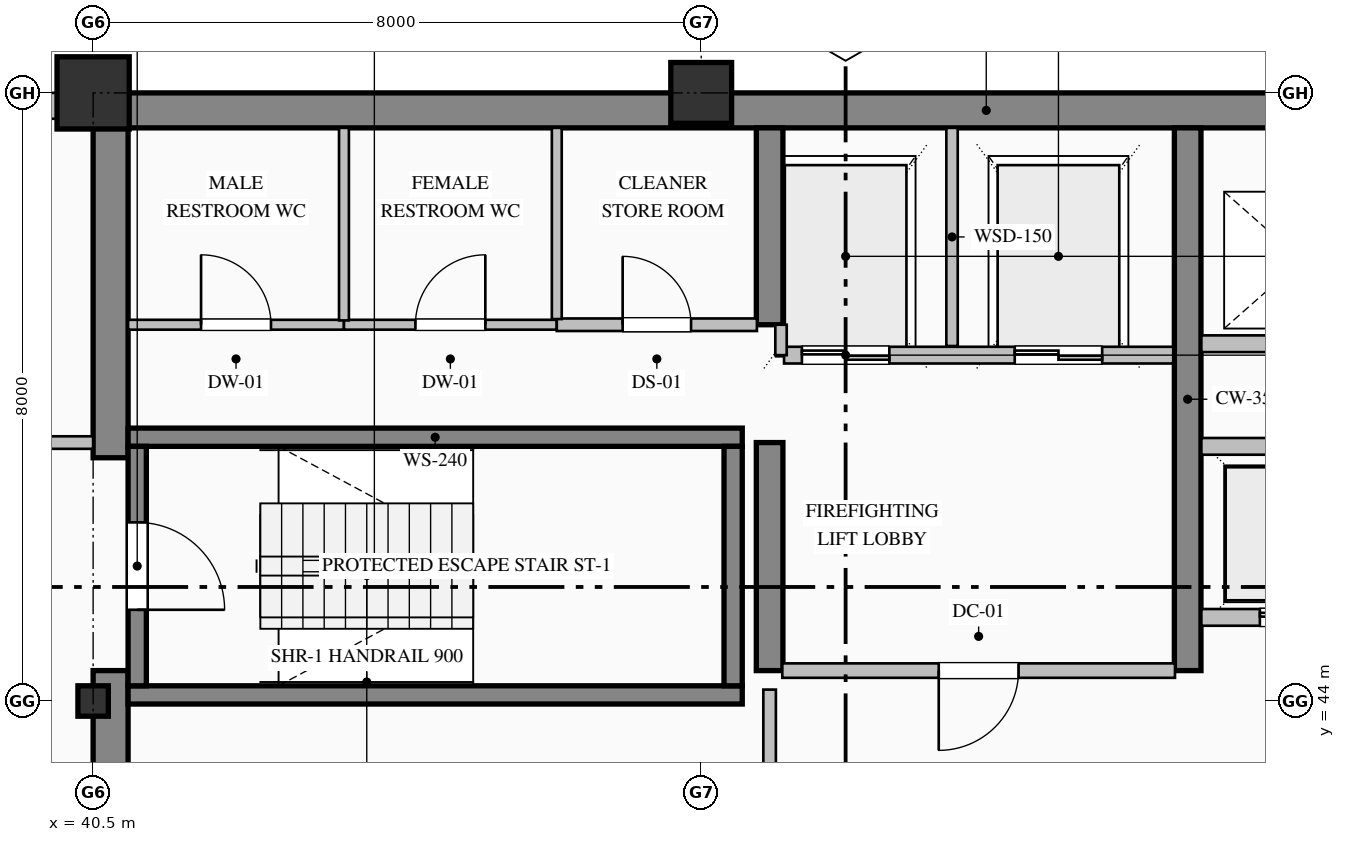
"""IFC4 building model, lengths in metres.
Left out: names, types, materials, properties, quantities, classifications, styles, units other than length and angle.
Written with IfcOpenShell. Run it as: python <this file> out.ifc"""

import sys

from ifc_helpers import new_model, si_unit, direction, frame, frame_2d, origin, origin_2d, place, context, subcontext, project, spatial, rectangle, hollow_rectangle, i_section, extrude, element, fill, save


model = new_model("IFC4")
c1 = context("Model", 3, precision=1e-05, world=origin(), true_north=direction((0.0, 1.0)))
c2 = subcontext(c1, "Body", "Model", "MODEL_VIEW")
j1 = project(units=[si_unit("LENGTHUNIT", "METRE"), si_unit("PLANEANGLEUNIT", "RADIAN")], contexts=[c1])
p1 = place(None, origin())
s1 = spatial("IfcSite", under=j1, at=p1, CompositionType="ELEMENT")
p2 = place(p1, origin())
s2 = spatial("IfcBuilding", under=s1, at=p2, CompositionType="ELEMENT")
p3 = place(p2, frame((0.0, 0.0, 221.8)))
s3 = spatial("IfcBuildingStorey", under=s2, at=p3, CompositionType="ELEMENT", Elevation=221.8)
p4 = place(p3, frame((40.5, 51.77, 0.0), z_axis=(0.0, 0.0, 1.0), x_axis=(1.0, 0.0, 0.0)))
e1 = element("IfcWall", 1, at=p4, inside=s3, PredefinedType="SHEAR", context=c2, shape_type="SweptSolid", body=[
    extrude(rectangle(XDim=23.5, YDim=0.46, at=frame_2d((11.75, 0.0))), origin(), (0.0, 0.0, 1.0), 3.775),
])
p5 = place(p3, frame((40.73, 36.46, 0.0), z_axis=(0.0, 0.0, 1.0), x_axis=(0.0, 1.0, 0.0)))
e2 = element("IfcWall", 2, at=p5, inside=s3, PredefinedType="SHEAR", context=c2, shape_type="SweptSolid", body=[
    extrude(rectangle(XDim=7.94, YDim=0.46, at=frame_2d((3.97, 0.0))), origin(), (0.0, 0.0, 1.0), 3.775),
])
p6 = place(p3, frame((40.73, 47.2, 0.0), z_axis=(0.0, 0.0, 1.0), x_axis=(0.0, 1.0, 0.0)))
e3 = element("IfcWall", 3, at=p6, inside=s3, PredefinedType="SHEAR", context=c2, shape_type="SweptSolid", body=[
    extrude(rectangle(XDim=4.34, YDim=0.46, at=frame_2d((2.17, 0.0))), origin(), (0.0, 0.0, 1.0), 3.775),
])
p7 = place(p3, frame((49.4, 44.4, 0.0), z_axis=(0.0, 0.0, 1.0), x_axis=(0.0, 1.0, 0.0)))
e4 = element("IfcWall", 4, at=p7, inside=s3, PredefinedType="SHEAR", context=c2, shape_type="SweptSolid", body=[
    extrude(rectangle(XDim=3.0, YDim=0.35, at=frame_2d((1.5, 0.0))), origin(), (0.0, 0.0, 1.0), 3.775),
])
p8 = place(p3, frame((49.4, 48.95, 0.0), z_axis=(0.0, 0.0, 1.0), x_axis=(0.0, 1.0, 0.0)))
e5 = element("IfcWall", 5, at=p8, inside=s3, PredefinedType="SHEAR", context=c2, shape_type="SweptSolid", body=[
    extrude(rectangle(XDim=2.59, YDim=0.35, at=frame_2d((1.295, 0.0))), origin(), (0.0, 0.0, 1.0), 3.775),
])
p9 = place(p3, frame((54.9, 44.4, 0.0), z_axis=(0.0, 0.0, 1.0), x_axis=(0.0, 1.0, 0.0)))
e6 = element("IfcWall", 6, at=p9, inside=s3, PredefinedType="SHEAR", context=c2, shape_type="SweptSolid", body=[
    extrude(rectangle(XDim=7.14, YDim=0.35, at=frame_2d((3.57, 0.0))), origin(), (0.0, 0.0, 1.0), 3.775),
])
p10 = place(p3, frame((40.5, 44.0, 0.0), z_axis=(0.0, 0.0, 1.0), x_axis=(1.0, 0.0, 0.0)))
e7 = element("IfcColumn", 7, at=p10, inside=s3, PredefinedType="COLUMN", context=c2, shape_type="SweptSolid", body=[
    extrude(i_section(OverallWidth=0.4, OverallDepth=0.4, WebThickness=0.013, FlangeThickness=0.021, FilletRadius=0.022, at=origin_2d()), origin(), (0.0, 0.0, 1.0), 4.0),
])
p11 = place(p3, frame((40.5, 52.0, 0.0), z_axis=(0.0, 0.0, 1.0), x_axis=(1.0, 0.0, 0.0)))
e8 = element("IfcColumn", 8, at=p11, inside=s3, PredefinedType="COLUMN", context=c2, shape_type="SweptSolid", body=[
    extrude(hollow_rectangle(XDim=0.95, YDim=0.95, WallThickness=0.036, at=origin_2d()), origin(), (0.0, 0.0, 1.0), 4.0),
])
p12 = place(p3, frame((48.5, 52.0, 0.0), z_axis=(0.0, 0.0, 1.0), x_axis=(1.0, 0.0, 0.0)))
e9 = element("IfcColumn", 9, at=p12, inside=s3, PredefinedType="COLUMN", context=c2, shape_type="SweptSolid", body=[
    extrude(hollow_rectangle(XDim=0.8, YDim=0.8, WallThickness=0.032, at=origin_2d()), origin(), (0.0, 0.0, 1.0), 4.0),
])
p13 = place(p3, frame((13.0, 51.83, 0.0), z_axis=(0.0, 0.0, 1.0), x_axis=(1.0, 0.0, 0.0)))
e10 = element("IfcWall", 10, at=p13, inside=s3, PredefinedType="SOLIDWALL", context=c2, shape_type="SweptSolid", body=[
    extrude(rectangle(XDim=27.52, YDim=0.34, at=frame_2d((13.76, 0.0))), origin(), (0.0, 0.0, 1.0), 3.325),
])
p14 = place(p13, frame((6.45, 0.0, 0.7)))
e11 = element("IfcOpeningElement", 11, at=p14, cuts=e10, PredefinedType="OPENING", context=c2, shape_type="SweptSolid", body=[
    extrude(rectangle(XDim=1.5, YDim=2.4, at=frame_2d((0.75, 1.2))), frame((0.0, 0.18, 0.0), z_axis=(0.0, -1.0, 0.0), x_axis=(1.0, 0.0, 0.0)), (0.0, 0.0, 1.0), 0.36),
])
for number, where, z_axis, x_axis in (
    (12, (40.96, 47.47, 0.0), (0.0, 0.0, 1.0), (1.0, 0.0, 0.0)),
    (13, (49.04, 44.08, 0.0), (0.0, 0.0, 1.0), (-1.0, 0.0, 0.0)),
):
    element("IfcWall", number, at=place(p3, frame(where, z_axis=z_axis, x_axis=x_axis)), inside=s3, PredefinedType="SOLIDWALL", context=c2, shape_type="SweptSolid", body=[
        extrude(rectangle(XDim=8.08, YDim=0.24, at=frame_2d((4.04, 0.0))), origin(), (0.0, 0.0, 1.0), 4.0),
    ])
p15 = place(p3, frame((41.08, 47.35, 0.0), z_axis=(0.0, 0.0, 1.0), x_axis=(0.0, -1.0, 0.0)))
e14 = element("IfcWall", 14, at=p15, inside=s3, PredefinedType="SOLIDWALL", context=c2, shape_type="SweptSolid", body=[
    extrude(rectangle(XDim=3.15, YDim=0.24, at=frame_2d((1.575, 0.0))), origin(), (0.0, 0.0, 1.0), 4.0),
])
p16 = place(p15, frame((1.0, 0.0, 0.0)))
e15 = element("IfcOpeningElement", 15, at=p16, cuts=e14, PredefinedType="OPENING", context=c2, shape_type="SweptSolid", body=[
    extrude(rectangle(XDim=1.15, YDim=2.2, at=frame_2d((0.575, 1.1))), frame((0.0, 0.13, 0.0), z_axis=(0.0, -1.0, 0.0), x_axis=(1.0, 0.0, 0.0)), (0.0, 0.0, 1.0), 0.26),
])
p17 = place(p3, frame((48.92, 44.2, 0.0), z_axis=(0.0, 0.0, 1.0), x_axis=(0.0, 1.0, 0.0)))
e16 = element("IfcWall", 16, at=p17, inside=s3, PredefinedType="SOLIDWALL", context=c2, shape_type="SweptSolid", body=[
    extrude(rectangle(XDim=3.15, YDim=0.24, at=frame_2d((1.575, 0.0))), origin(), (0.0, 0.0, 1.0), 4.0),
])
p18 = place(p3, frame((54.71, 48.55, 0.0), z_axis=(0.0, 0.0, 1.0), x_axis=(-1.0, 0.0, 0.0)))
e17 = element("IfcWall", 17, at=p18, inside=s3, PredefinedType="PARTITIONING", context=c2, shape_type="SweptSolid", body=[
    extrude(rectangle(XDim=5.12, YDim=0.22, at=frame_2d((2.56, 0.0))), origin(), (0.0, 0.0, 1.0), 3.775),
])
p19 = place(p18, frame((3.735, 0.0, 0.0)))
e18 = element("IfcOpeningElement", 18, at=p19, cuts=e17, PredefinedType="OPENING", context=c2, shape_type="SweptSolid", body=[
    extrude(rectangle(XDim=1.15, YDim=2.2, at=frame_2d((0.575, 1.1))), frame((0.0, 0.12, 0.0), z_axis=(0.0, -1.0, 0.0), x_axis=(1.0, 0.0, 0.0)), (0.0, 0.0, 1.0), 0.24),
])
p20 = place(p18, frame((0.935, 0.0, 0.0)))
e19 = element("IfcOpeningElement", 19, at=p20, cuts=e17, PredefinedType="OPENING", context=c2, shape_type="SweptSolid", body=[
    extrude(rectangle(XDim=1.15, YDim=2.2, at=frame_2d((0.575, 1.1))), frame((0.0, 0.12, 0.0), z_axis=(0.0, -1.0, 0.0), x_axis=(1.0, 0.0, 0.0)), (0.0, 0.0, 1.0), 0.24),
])
p21 = place(p3, frame((51.8, 48.67, 0.0), z_axis=(0.0, 0.0, 1.0), x_axis=(0.0, 1.0, 0.0)))
e20 = element("IfcWall", 20, at=p21, inside=s3, PredefinedType="PARTITIONING", context=c2, shape_type="SweptSolid", body=[
    extrude(rectangle(XDim=2.87, YDim=0.15, at=frame_2d((1.435, 0.0))), origin(), (0.0, 0.0, 1.0), 3.775),
])
p22 = place(p3, frame((49.55, 48.55, 0.0), z_axis=(0.0, 0.0, 1.0), x_axis=(0.0, 1.0, 0.0)))
e21 = element("IfcWall", 21, at=p22, inside=s3, PredefinedType="PARTITIONING", context=c2, shape_type="SweptSolid", body=[
    extrude(rectangle(XDim=0.4, YDim=0.15, at=frame_2d((0.2, 0.0))), origin(), (0.0, 0.0, 1.0), 3.775),
])
p23 = place(p3, frame((63.32, 45.1, 0.0), z_axis=(0.0, 0.0, 1.0), x_axis=(-1.0, 0.0, 0.0)))
e22 = element("IfcWall", 22, at=p23, inside=s3, PredefinedType="PARTITIONING", context=c2, shape_type="SweptSolid", body=[
    extrude(rectangle(XDim=8.24, YDim=0.22, at=frame_2d((4.12, 0.0))), origin(), (0.0, 0.0, 1.0), 3.775),
])
p24 = place(p23, frame((6.37, 0.0, 0.0)))
e23 = element("IfcOpeningElement", 23, at=p24, cuts=e22, PredefinedType="OPENING", context=c2, shape_type="SweptSolid", body=[
    extrude(rectangle(XDim=1.1, YDim=2.2, at=frame_2d((0.55, 1.1))), frame((0.0, 0.12, 0.0), z_axis=(0.0, -1.0, 0.0), x_axis=(1.0, 0.0, 0.0)), (0.0, 0.0, 1.0), 0.24),
])
p25 = place(p23, frame((3.57, 0.0, 0.0)))
e24 = element("IfcOpeningElement", 24, at=p25, cuts=e22, PredefinedType="OPENING", context=c2, shape_type="SweptSolid", body=[
    extrude(rectangle(XDim=1.1, YDim=2.2, at=frame_2d((0.55, 1.1))), frame((0.0, 0.12, 0.0), z_axis=(0.0, -1.0, 0.0), x_axis=(1.0, 0.0, 0.0)), (0.0, 0.0, 1.0), 0.24),
])
p26 = place(p23, frame((0.77, 0.0, 0.0)))
e25 = element("IfcOpeningElement", 25, at=p26, cuts=e22, PredefinedType="OPENING", context=c2, shape_type="SweptSolid", body=[
    extrude(rectangle(XDim=1.1, YDim=2.2, at=frame_2d((0.55, 1.1))), frame((0.0, 0.12, 0.0), z_axis=(0.0, -1.0, 0.0), x_axis=(1.0, 0.0, 0.0)), (0.0, 0.0, 1.0), 0.24),
])
for number, where, z_axis, x_axis in (
    (26, (55.08, 47.35, 0.0), (0.0, 0.0, 1.0), (1.0, 0.0, 0.0)),
    (27, (63.32, 48.7, 0.0), (0.0, 0.0, 1.0), (-1.0, 0.0, 0.0)),
):
    element("IfcWall", number, at=place(p3, frame(where, z_axis=z_axis, x_axis=x_axis)), inside=s3, PredefinedType="PARTITIONING", context=c2, shape_type="SweptSolid", body=[
        extrude(rectangle(XDim=8.24, YDim=0.22, at=frame_2d((4.12, 0.0))), origin(), (0.0, 0.0, 1.0), 3.775),
    ])
p27 = place(p3, frame((37.8, 47.4, 0.0), z_axis=(0.0, 0.0, 1.0), x_axis=(1.0, 0.0, 0.0)))
e28 = element("IfcWall", 28, at=p27, inside=s3, PredefinedType="PARTITIONING", context=c2, shape_type="SweptSolid", body=[
    extrude(rectangle(XDim=2.7, YDim=0.165, at=frame_2d((1.35, 0.0))), origin(), (0.0, 0.0, 1.0), 3.775),
])
p28 = place(p27, frame((0.825, 0.0, 0.0)))
e29 = element("IfcOpeningElement", 29, at=p28, cuts=e28, PredefinedType="OPENING", context=c2, shape_type="SweptSolid", body=[
    extrude(rectangle(XDim=1.05, YDim=2.15, at=frame_2d((0.525, 1.075))), frame((0.0, 0.093, 0.0), z_axis=(0.0, -1.0, 0.0), x_axis=(1.0, 0.0, 0.0)), (0.0, 0.0, 1.0), 0.185),
])
p29 = place(p3, frame((40.96, 48.95, 0.0), z_axis=(0.0, 0.0, 1.0), x_axis=(1.0, 0.0, 0.0)))
e30 = element("IfcWall", 30, at=p29, inside=s3, PredefinedType="PARTITIONING", context=c2, shape_type="SweptSolid", body=[
    extrude(rectangle(XDim=2.84, YDim=0.13, at=frame_2d((1.42, 0.0))), origin(), (0.0, 0.0, 1.0), 3.775),
])
p30 = place(p29, frame((0.96, 0.0, 0.0)))
e31 = element("IfcOpeningElement", 31, at=p30, cuts=e30, PredefinedType="OPENING", context=c2, shape_type="SweptSolid", body=[
    extrude(rectangle(XDim=0.92, YDim=2.15, at=frame_2d((0.46, 1.075))), frame((0.0, 0.075, 0.0), z_axis=(0.0, -1.0, 0.0), x_axis=(1.0, 0.0, 0.0)), (0.0, 0.0, 1.0), 0.15),
])
p31 = place(p3, frame((43.8, 48.95, 0.0), z_axis=(0.0, 0.0, 1.0), x_axis=(1.0, 0.0, 0.0)))
e32 = element("IfcWall", 32, at=p31, inside=s3, PredefinedType="PARTITIONING", context=c2, shape_type="SweptSolid", body=[
    extrude(rectangle(XDim=2.8, YDim=0.13, at=frame_2d((1.4, 0.0))), origin(), (0.0, 0.0, 1.0), 3.775),
])
p32 = place(p31, frame((0.94, 0.0, 0.0)))
e33 = element("IfcOpeningElement", 33, at=p32, cuts=e32, PredefinedType="OPENING", context=c2, shape_type="SweptSolid", body=[
    extrude(rectangle(XDim=0.92, YDim=2.15, at=frame_2d((0.46, 1.075))), frame((0.0, 0.075, 0.0), z_axis=(0.0, -1.0, 0.0), x_axis=(1.0, 0.0, 0.0)), (0.0, 0.0, 1.0), 0.15),
])
p33 = place(p3, frame((46.6, 48.95, 0.0), z_axis=(0.0, 0.0, 1.0), x_axis=(1.0, 0.0, 0.0)))
e34 = element("IfcWall", 34, at=p33, inside=s3, PredefinedType="PARTITIONING", context=c2, shape_type="SweptSolid", body=[
    extrude(rectangle(XDim=2.633, YDim=0.165, at=frame_2d((1.316, 0.0))), origin(), (0.0, 0.0, 1.0), 3.775),
])
p34 = place(p33, frame((0.866, 0.0, 0.0)))
e35 = element("IfcOpeningElement", 35, at=p34, cuts=e34, PredefinedType="OPENING", context=c2, shape_type="SweptSolid", body=[
    extrude(rectangle(XDim=0.9, YDim=2.15, at=frame_2d((0.45, 1.075))), frame((0.0, 0.093, 0.0), z_axis=(0.0, -1.0, 0.0), x_axis=(1.0, 0.0, 0.0)), (0.0, 0.0, 1.0), 0.185),
])
p35 = place(p3, frame((54.733, 44.4, 0.0), z_axis=(0.0, 0.0, 1.0), x_axis=(-1.0, 0.0, 0.0)))
e36 = element("IfcWall", 36, at=p35, inside=s3, PredefinedType="PARTITIONING", context=c2, shape_type="SweptSolid", body=[
    extrude(rectangle(XDim=5.166, YDim=0.19, at=frame_2d((2.583, 0.0))), origin(), (0.0, 0.0, 1.0), 3.775),
])
p36 = place(p35, frame((2.058, 0.0, 0.0)))
e37 = element("IfcOpeningElement", 37, at=p36, cuts=e36, PredefinedType="OPENING", context=c2, shape_type="SweptSolid", body=[
    extrude(rectangle(XDim=1.05, YDim=2.15, at=frame_2d((0.525, 1.075))), frame((0.0, 0.105, 0.0), z_axis=(0.0, -1.0, 0.0), x_axis=(1.0, 0.0, 0.0)), (0.0, 0.0, 1.0), 0.21),
])
p37 = place(p3, frame((49.4, 39.647, 0.0), z_axis=(0.0, 0.0, 1.0), x_axis=(0.0, 1.0, 0.0)))
e38 = element("IfcWall", 38, at=p37, inside=s3, PredefinedType="PARTITIONING", context=c2, shape_type="SweptSolid", body=[
    extrude(rectangle(XDim=4.503, YDim=0.165, at=frame_2d((2.251, 0.0))), origin(), (0.0, 0.0, 1.0), 3.017),
])
p38 = place(p37, frame((1.802, 0.0, 0.0)))
e39 = element("IfcOpeningElement", 39, at=p38, cuts=e38, PredefinedType="OPENING", context=c2, shape_type="SweptSolid", body=[
    extrude(rectangle(XDim=0.9, YDim=2.15, at=frame_2d((0.45, 1.075))), frame((0.0, 0.093, 0.0), z_axis=(0.0, -1.0, 0.0), x_axis=(1.0, 0.0, 0.0)), (0.0, 0.0, 1.0), 0.185),
])
p39 = place(p3, frame((43.8, 51.54, 0.0), z_axis=(0.0, 0.0, 1.0), x_axis=(0.0, -1.0, 0.0)))
e40 = element("IfcWall", 40, at=p39, inside=s3, PredefinedType="PARTITIONING", context=c2, shape_type="SweptSolid", body=[
    extrude(rectangle(XDim=2.533, YDim=0.13, at=frame_2d((1.267, 0.0))), origin(), (0.0, 0.0, 1.0), 3.775),
])
p40 = place(p3, frame((46.6, 51.54, 0.0), z_axis=(0.0, 0.0, 1.0), x_axis=(0.0, -1.0, 0.0)))
e41 = element("IfcWall", 41, at=p40, inside=s3, PredefinedType="PARTITIONING", context=c2, shape_type="SweptSolid", body=[
    extrude(rectangle(XDim=2.516, YDim=0.13, at=frame_2d((1.258, 0.0))), origin(), (0.0, 0.0, 1.0), 3.775),
])
p41 = place(p16, origin())
e42 = element("IfcDoor", 42, at=p41, inside=s3, OperationType="SINGLE_SWING_RIGHT", PredefinedType="DOOR", context=c2, shape_type="SweptSolid", body=[
    extrude(rectangle(XDim=1.15, YDim=2.2, at=frame_2d((0.575, 1.1))), frame((0.0, 0.025, 0.0), z_axis=(0.0, -1.0, 0.0), x_axis=(1.0, 0.0, 0.0)), (0.0, 0.0, 1.0), 0.05),
])
fill(e15, e42)
p42 = place(p19, origin())
e43 = element("IfcDoor", 43, at=p42, inside=s3, OperationType="DOUBLE_DOOR_SLIDING", PredefinedType="DOOR", context=c2, shape_type="SweptSolid", body=[
    extrude(rectangle(XDim=1.15, YDim=2.2, at=frame_2d((0.575, 1.1))), frame((0.0, 0.025, 0.0), z_axis=(0.0, -1.0, 0.0), x_axis=(1.0, 0.0, 0.0)), (0.0, 0.0, 1.0), 0.05),
])
fill(e18, e43)
p43 = place(p20, origin())
e44 = element("IfcDoor", 44, at=p43, inside=s3, OperationType="DOUBLE_DOOR_SLIDING", PredefinedType="DOOR", context=c2, shape_type="SweptSolid", body=[
    extrude(rectangle(XDim=1.15, YDim=2.2, at=frame_2d((0.575, 1.1))), frame((0.0, 0.025, 0.0), z_axis=(0.0, -1.0, 0.0), x_axis=(1.0, 0.0, 0.0)), (0.0, 0.0, 1.0), 0.05),
])
fill(e19, e44)
p44 = place(p24, origin())
e45 = element("IfcDoor", 45, at=p44, inside=s3, OperationType="DOUBLE_DOOR_SLIDING", PredefinedType="DOOR", context=c2, shape_type="SweptSolid", body=[
    extrude(rectangle(XDim=1.1, YDim=2.2, at=frame_2d((0.55, 1.1))), frame((0.0, 0.025, 0.0), z_axis=(0.0, -1.0, 0.0), x_axis=(1.0, 0.0, 0.0)), (0.0, 0.0, 1.0), 0.05),
])
fill(e23, e45)
p45 = place(p36, origin())
e46 = element("IfcDoor", 46, at=p45, inside=s3, OperationType="SINGLE_SWING_RIGHT", PredefinedType="DOOR", context=c2, shape_type="SweptSolid", body=[
    extrude(rectangle(XDim=1.05, YDim=2.15, at=frame_2d((0.525, 1.075))), frame((0.0, 0.025, 0.0), z_axis=(0.0, -1.0, 0.0), x_axis=(1.0, 0.0, 0.0)), (0.0, 0.0, 1.0), 0.05),
])
fill(e37, e46)
p46 = place(p30, origin())
e47 = element("IfcDoor", 47, at=p46, inside=s3, OperationType="SINGLE_SWING_LEFT", PredefinedType="DOOR", context=c2, shape_type="SweptSolid", body=[
    extrude(rectangle(XDim=0.92, YDim=2.15, at=frame_2d((0.46, 1.075))), frame((0.0, 0.025, 0.0), z_axis=(0.0, -1.0, 0.0), x_axis=(1.0, 0.0, 0.0)), (0.0, 0.0, 1.0), 0.05),
])
fill(e31, e47)
p47 = place(p32, origin())
e48 = element("IfcDoor", 48, at=p47, inside=s3, OperationType="SINGLE_SWING_RIGHT", PredefinedType="DOOR", context=c2, shape_type="SweptSolid", body=[
    extrude(rectangle(XDim=0.92, YDim=2.15, at=frame_2d((0.46, 1.075))), frame((0.0, 0.025, 0.0), z_axis=(0.0, -1.0, 0.0), x_axis=(1.0, 0.0, 0.0)), (0.0, 0.0, 1.0), 0.05),
])
fill(e33, e48)
p48 = place(p34, origin())
e49 = element("IfcDoor", 49, at=p48, inside=s3, OperationType="SINGLE_SWING_LEFT", PredefinedType="DOOR", context=c2, shape_type="SweptSolid", body=[
    extrude(rectangle(XDim=0.9, YDim=2.15, at=frame_2d((0.45, 1.075))), frame((0.0, 0.025, 0.0), z_axis=(0.0, -1.0, 0.0), x_axis=(1.0, 0.0, 0.0)), (0.0, 0.0, 1.0), 0.05),
])
fill(e35, e49)
save(model, sys.argv[1])
